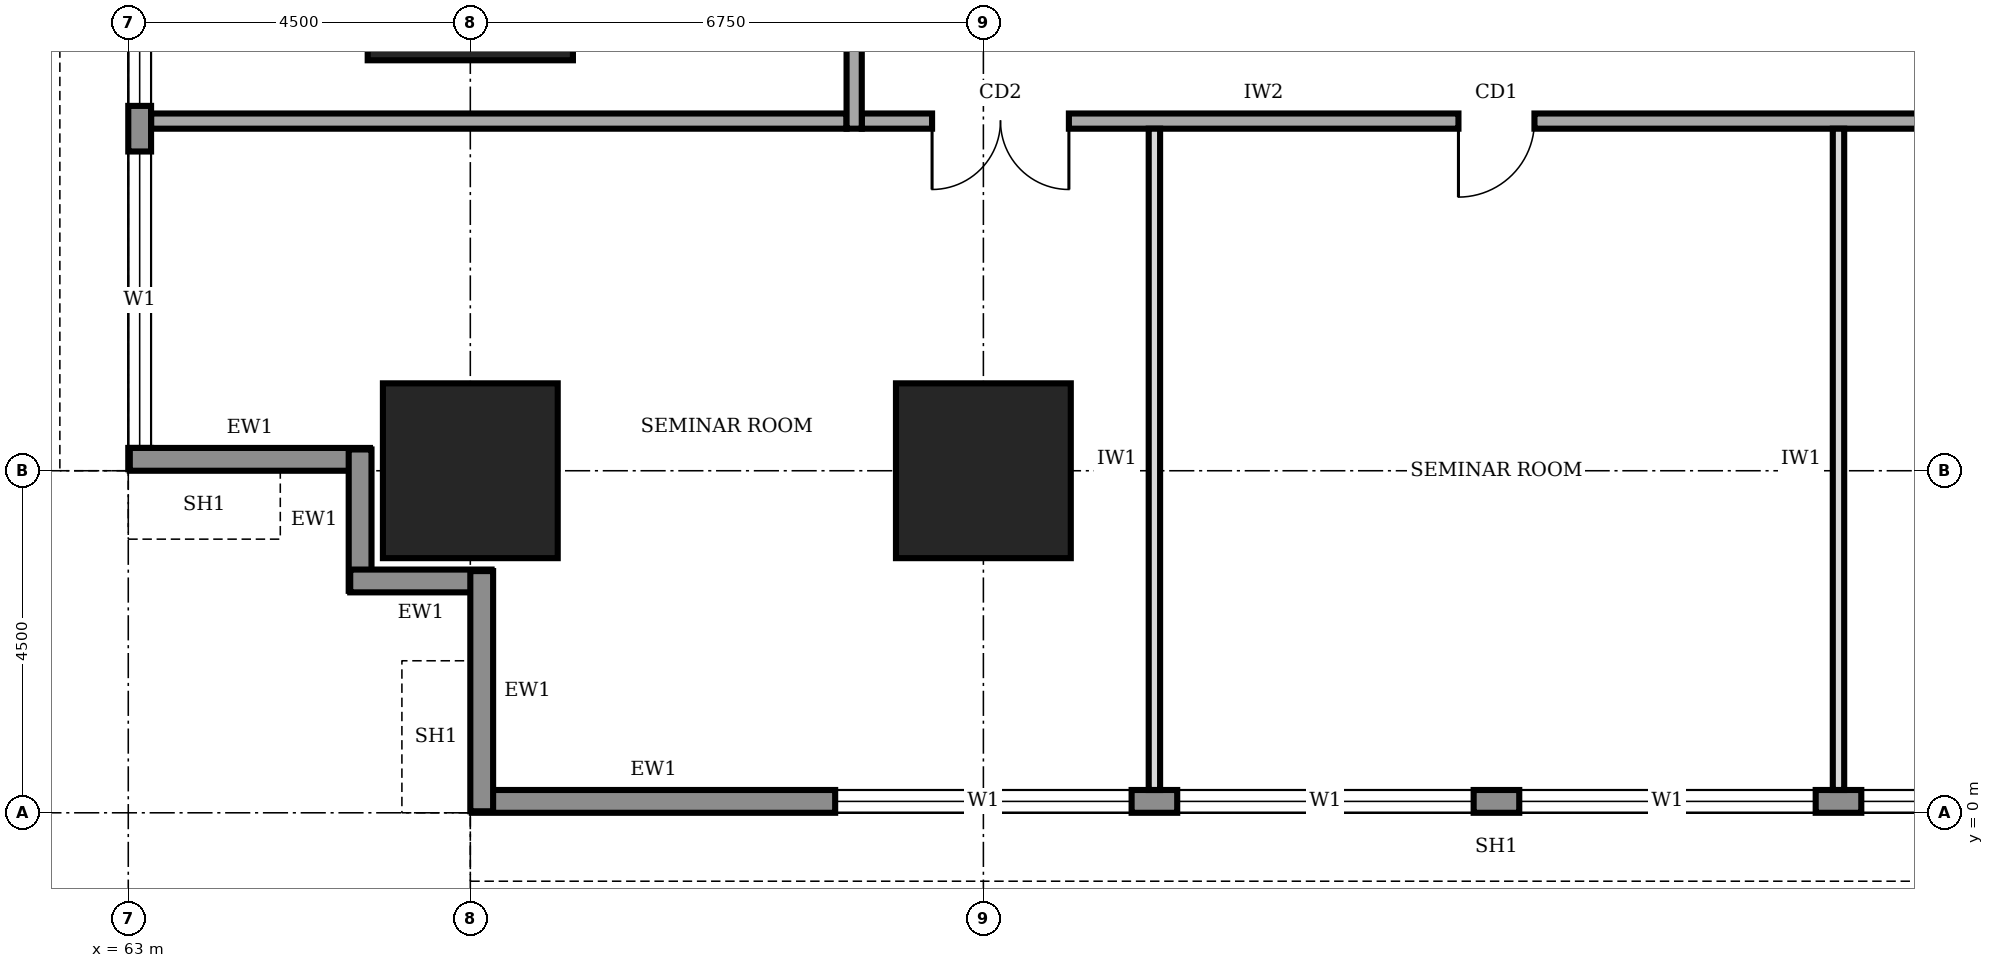
"""IFC4 building model, lengths in metres.
Left out: names, types, materials, properties, quantities, classifications, styles, units other than length and angle.
Written with IfcOpenShell. Run it as: python <this file> out.ifc"""

import sys

from ifc_helpers import new_model, si_unit, direction, frame, frame_2d, origin, origin_2d, place, context, subcontext, project, spatial, rectangle, extrude, element, fill, save


model = new_model("IFC4")
c1 = context("Model", 3, precision=1e-05, world=origin(), true_north=direction((0.0, 1.0)))
c2 = subcontext(c1, "Body", "Model", "MODEL_VIEW")
j1 = project(units=[si_unit("LENGTHUNIT", "METRE"), si_unit("PLANEANGLEUNIT", "RADIAN")], contexts=[c1])
p1 = place(None, origin())
s1 = spatial("IfcSite", under=j1, at=p1, CompositionType="ELEMENT")
p2 = place(p1, origin())
s2 = spatial("IfcBuilding", under=s1, at=p2, CompositionType="ELEMENT")
p3 = place(p2, frame((0.0, 0.0, 29.0)))
s3 = spatial("IfcBuildingStorey", under=s2, at=p3, CompositionType="ELEMENT", Elevation=29.0)
for number, where, z_axis, x_axis in (
    (1, (67.5, 4.5, 0.0), (0.0, 0.0, 1.0), (1.0, 0.0, 0.0)),
    (2, (74.25, 4.5, 0.0), (0.0, 0.0, 1.0), (1.0, 0.0, 0.0)),
):
    element("IfcColumn", number, at=place(p3, frame(where, z_axis=z_axis, x_axis=x_axis)), inside=s3, PredefinedType="COLUMN", context=c2, shape_type="SweptSolid", body=[
        extrude(rectangle(XDim=2.3, YDim=2.3, at=origin_2d()), origin(), (0.0, 0.0, 1.0), 4.0),
    ])
p4 = place(p3, frame((67.5, 11.25, 0.0), z_axis=(0.0, 0.0, 1.0), x_axis=(1.0, 0.0, 0.0)))
e3 = element("IfcColumn", 3, at=p4, inside=s3, PredefinedType="COLUMN", context=c2, shape_type="SweptSolid", body=[
    extrude(rectangle(XDim=2.7, YDim=2.7, at=origin_2d()), origin(), (0.0, 0.0, 1.0), 4.0),
])
p5 = place(p3, frame((67.52, 0.15, 0.0), z_axis=(0.0, 0.0, 1.0), x_axis=(1.0, 0.0, 0.0)))
e4 = element("IfcWall", 4, at=p5, inside=s3, PredefinedType="STANDARD", context=c2, shape_type="SweptSolid", body=[
    extrude(rectangle(XDim=26.96, YDim=0.3, at=frame_2d((13.48, 0.0))), origin(), (0.0, 0.0, 1.0), 3.75),
])
p6 = place(p5, frame((4.78, 0.0, 0.9)))
e5 = element("IfcOpeningElement", 5, at=p6, cuts=e4, PredefinedType="OPENING", context=c2, shape_type="SweptSolid", body=[
    extrude(rectangle(XDim=3.9, YDim=2.2, at=frame_2d((1.95, 1.1))), frame((0.0, 0.16, 0.0), z_axis=(0.0, -1.0, 0.0), x_axis=(1.0, 0.0, 0.0)), (0.0, 0.0, 1.0), 0.32),
])
p7 = place(p5, frame((9.28, 0.0, 0.9)))
e6 = element("IfcOpeningElement", 6, at=p7, cuts=e4, PredefinedType="OPENING", context=c2, shape_type="SweptSolid", body=[
    extrude(rectangle(XDim=3.9, YDim=2.2, at=frame_2d((1.95, 1.1))), frame((0.0, 0.16, 0.0), z_axis=(0.0, -1.0, 0.0), x_axis=(1.0, 0.0, 0.0)), (0.0, 0.0, 1.0), 0.32),
])
p8 = place(p5, frame((13.78, 0.0, 0.9)))
e7 = element("IfcOpeningElement", 7, at=p8, cuts=e4, PredefinedType="OPENING", context=c2, shape_type="SweptSolid", body=[
    extrude(rectangle(XDim=3.9, YDim=2.2, at=frame_2d((1.95, 1.1))), frame((0.0, 0.16, 0.0), z_axis=(0.0, -1.0, 0.0), x_axis=(1.0, 0.0, 0.0)), (0.0, 0.0, 1.0), 0.32),
])
p9 = place(p5, frame((18.28, 0.0, 0.9)))
e8 = element("IfcOpeningElement", 8, at=p9, cuts=e4, PredefinedType="OPENING", context=c2, shape_type="SweptSolid", body=[
    extrude(rectangle(XDim=3.9, YDim=2.2, at=frame_2d((1.95, 1.1))), frame((0.0, 0.16, 0.0), z_axis=(0.0, -1.0, 0.0), x_axis=(1.0, 0.0, 0.0)), (0.0, 0.0, 1.0), 0.32),
])
p10 = place(p5, frame((22.78, 0.0, 0.9)))
e9 = element("IfcOpeningElement", 9, at=p10, cuts=e4, PredefinedType="OPENING", context=c2, shape_type="SweptSolid", body=[
    extrude(rectangle(XDim=3.9, YDim=2.2, at=frame_2d((1.95, 1.1))), frame((0.0, 0.16, 0.0), z_axis=(0.0, -1.0, 0.0), x_axis=(1.0, 0.0, 0.0)), (0.0, 0.0, 1.0), 0.32),
])
p11 = place(p3, frame((63.15, 35.98, 0.0), z_axis=(0.0, 0.0, 1.0), x_axis=(0.0, -1.0, 0.0)))
e10 = element("IfcWall", 10, at=p11, inside=s3, PredefinedType="STANDARD", context=c2, shape_type="SweptSolid", body=[
    extrude(rectangle(XDim=31.46, YDim=0.3, at=frame_2d((15.73, 0.0))), origin(), (0.0, 0.0, 1.0), 3.75),
])
p12 = place(p11, frame((27.28, 0.0, 0.9)))
e11 = element("IfcOpeningElement", 11, at=p12, cuts=e10, PredefinedType="OPENING", context=c2, shape_type="SweptSolid", body=[
    extrude(rectangle(XDim=3.9, YDim=2.2, at=frame_2d((1.95, 1.1))), frame((0.0, 0.16, 0.0), z_axis=(0.0, -1.0, 0.0), x_axis=(1.0, 0.0, 0.0)), (0.0, 0.0, 1.0), 0.32),
])
p13 = place(p11, frame((22.78, 0.0, 0.9)))
e12 = element("IfcOpeningElement", 12, at=p13, cuts=e10, PredefinedType="OPENING", context=c2, shape_type="SweptSolid", body=[
    extrude(rectangle(XDim=3.9, YDim=2.2, at=frame_2d((1.95, 1.1))), frame((0.0, 0.16, 0.0), z_axis=(0.0, -1.0, 0.0), x_axis=(1.0, 0.0, 0.0)), (0.0, 0.0, 1.0), 0.32),
])
p14 = place(p11, frame((18.28, 0.0, 0.9)))
e13 = element("IfcOpeningElement", 13, at=p14, cuts=e10, PredefinedType="OPENING", context=c2, shape_type="SweptSolid", body=[
    extrude(rectangle(XDim=3.9, YDim=2.2, at=frame_2d((1.95, 1.1))), frame((0.0, 0.16, 0.0), z_axis=(0.0, -1.0, 0.0), x_axis=(1.0, 0.0, 0.0)), (0.0, 0.0, 1.0), 0.32),
])
p15 = place(p11, frame((13.78, 0.0, 0.9)))
e14 = element("IfcOpeningElement", 14, at=p15, cuts=e10, PredefinedType="OPENING", context=c2, shape_type="SweptSolid", body=[
    extrude(rectangle(XDim=3.9, YDim=2.2, at=frame_2d((1.95, 1.1))), frame((0.0, 0.16, 0.0), z_axis=(0.0, -1.0, 0.0), x_axis=(1.0, 0.0, 0.0)), (0.0, 0.0, 1.0), 0.32),
])
p16 = place(p11, frame((9.28, 0.0, 0.9)))
e15 = element("IfcOpeningElement", 15, at=p16, cuts=e10, PredefinedType="OPENING", context=c2, shape_type="SweptSolid", body=[
    extrude(rectangle(XDim=3.9, YDim=2.2, at=frame_2d((1.95, 1.1))), frame((0.0, 0.16, 0.0), z_axis=(0.0, -1.0, 0.0), x_axis=(1.0, 0.0, 0.0)), (0.0, 0.0, 1.0), 0.32),
])
p17 = place(p11, frame((4.78, 0.0, 0.9)))
e16 = element("IfcOpeningElement", 16, at=p17, cuts=e10, PredefinedType="OPENING", context=c2, shape_type="SweptSolid", body=[
    extrude(rectangle(XDim=3.9, YDim=2.2, at=frame_2d((1.95, 1.1))), frame((0.0, 0.16, 0.0), z_axis=(0.0, -1.0, 0.0), x_axis=(1.0, 0.0, 0.0)), (0.0, 0.0, 1.0), 0.32),
])
p18 = place(p3, frame((63.02, 4.65, 0.0), z_axis=(0.0, 0.0, 1.0), x_axis=(1.0, 0.0, 0.0)))
e17 = element("IfcWall", 17, at=p18, inside=s3, PredefinedType="STANDARD", context=c2, shape_type="SweptSolid", body=[
    extrude(rectangle(XDim=3.16, YDim=0.3, at=frame_2d((1.58, 0.0))), origin(), (0.0, 0.0, 1.0), 2.85),
])
for number, where, z_axis, x_axis in (
    (18, (66.05, 4.78, 0.0), (0.0, 0.0, 1.0), (0.0, -1.0, 0.0)),
    (19, (65.92, 3.05, 0.0), (0.0, 0.0, 1.0), (1.0, 0.0, 0.0)),
):
    element("IfcWall", number, at=place(p3, frame(where, z_axis=z_axis, x_axis=x_axis)), inside=s3, PredefinedType="STANDARD", context=c2, shape_type="SweptSolid", body=[
        extrude(rectangle(XDim=1.86, YDim=0.3, at=frame_2d((0.93, 0.0))), origin(), (0.0, 0.0, 1.0), 3.75),
    ])
p19 = place(p3, frame((67.65, 3.18, 0.0), z_axis=(0.0, 0.0, 1.0), x_axis=(0.0, -1.0, 0.0)))
e20 = element("IfcWall", 20, at=p19, inside=s3, PredefinedType="STANDARD", context=c2, shape_type="SweptSolid", body=[
    extrude(rectangle(XDim=3.16, YDim=0.3, at=frame_2d((1.58, 0.0))), origin(), (0.0, 0.0, 1.0), 2.85),
])
p20 = place(p3, frame((72.65, 9.1, 0.0), z_axis=(0.0, 0.0, 1.0), x_axis=(1.0, 0.0, 0.0)))
e21 = element("IfcWall", 21, at=p20, inside=s3, PredefinedType="SOLIDWALL", context=c2, shape_type="SweptSolid", body=[
    extrude(rectangle(XDim=16.9, YDim=0.2, at=frame_2d((8.45, 0.0))), origin(), (0.0, 0.0, 1.0), 3.75),
])
p21 = place(p20, frame((0.925, 0.0, 0.0)))
e22 = element("IfcOpeningElement", 22, at=p21, cuts=e21, PredefinedType="OPENING", context=c2, shape_type="SweptSolid", body=[
    extrude(rectangle(XDim=1.8, YDim=2.1, at=frame_2d((0.9, 1.05))), frame((0.0, 0.11, 0.0), z_axis=(0.0, -1.0, 0.0), x_axis=(1.0, 0.0, 0.0)), (0.0, 0.0, 1.0), 0.22),
])
p22 = place(p20, frame((7.85, 0.0, 0.0)))
e23 = element("IfcOpeningElement", 23, at=p22, cuts=e21, PredefinedType="OPENING", context=c2, shape_type="SweptSolid", body=[
    extrude(rectangle(XDim=1.0, YDim=2.1, at=frame_2d((0.5, 1.05))), frame((0.0, 0.11, 0.0), z_axis=(0.0, -1.0, 0.0), x_axis=(1.0, 0.0, 0.0)), (0.0, 0.0, 1.0), 0.22),
])
p23 = place(p20, frame((13.975, 0.0, 0.0)))
e24 = element("IfcOpeningElement", 24, at=p23, cuts=e21, PredefinedType="OPENING", context=c2, shape_type="SweptSolid", body=[
    extrude(rectangle(XDim=1.8, YDim=2.1, at=frame_2d((0.9, 1.05))), frame((0.0, 0.11, 0.0), z_axis=(0.0, -1.0, 0.0), x_axis=(1.0, 0.0, 0.0)), (0.0, 0.0, 1.0), 0.22),
])
p24 = place(p3, frame((72.55, 32.8, 0.0), z_axis=(0.0, 0.0, 1.0), x_axis=(0.0, -1.0, 0.0)))
e25 = element("IfcWall", 25, at=p24, inside=s3, PredefinedType="SOLIDWALL", context=c2, shape_type="SweptSolid", body=[
    extrude(rectangle(XDim=23.8, YDim=0.2, at=frame_2d((11.9, 0.0))), origin(), (0.0, 0.0, 1.0), 3.75),
])
p25 = place(p24, frame((21.05, 0.0, 0.0)))
e26 = element("IfcOpeningElement", 26, at=p25, cuts=e25, PredefinedType="OPENING", context=c2, shape_type="SweptSolid", body=[
    extrude(rectangle(XDim=1.0, YDim=2.1, at=frame_2d((0.5, 1.05))), frame((0.0, 0.11, 0.0), z_axis=(0.0, -1.0, 0.0), x_axis=(1.0, 0.0, 0.0)), (0.0, 0.0, 1.0), 0.22),
])
p26 = place(p24, frame((16.55, 0.0, 0.0)))
e27 = element("IfcOpeningElement", 27, at=p26, cuts=e25, PredefinedType="OPENING", context=c2, shape_type="SweptSolid", body=[
    extrude(rectangle(XDim=1.0, YDim=2.1, at=frame_2d((0.5, 1.05))), frame((0.0, 0.11, 0.0), z_axis=(0.0, -1.0, 0.0), x_axis=(1.0, 0.0, 0.0)), (0.0, 0.0, 1.0), 0.22),
])
p27 = place(p24, frame((12.05, 0.0, 0.0)))
e28 = element("IfcOpeningElement", 28, at=p27, cuts=e25, PredefinedType="OPENING", context=c2, shape_type="SweptSolid", body=[
    extrude(rectangle(XDim=1.0, YDim=2.1, at=frame_2d((0.5, 1.05))), frame((0.0, 0.11, 0.0), z_axis=(0.0, -1.0, 0.0), x_axis=(1.0, 0.0, 0.0)), (0.0, 0.0, 1.0), 0.22),
])
p28 = place(p24, frame((7.55, 0.0, 0.0)))
e29 = element("IfcOpeningElement", 29, at=p28, cuts=e25, PredefinedType="OPENING", context=c2, shape_type="SweptSolid", body=[
    extrude(rectangle(XDim=1.0, YDim=2.1, at=frame_2d((0.5, 1.05))), frame((0.0, 0.11, 0.0), z_axis=(0.0, -1.0, 0.0), x_axis=(1.0, 0.0, 0.0)), (0.0, 0.0, 1.0), 0.22),
])
p29 = place(p24, frame((2.3, 0.0, 0.0)))
e30 = element("IfcOpeningElement", 30, at=p29, cuts=e25, PredefinedType="OPENING", context=c2, shape_type="SweptSolid", body=[
    extrude(rectangle(XDim=1.0, YDim=2.1, at=frame_2d((0.5, 1.05))), frame((0.0, 0.11, 0.0), z_axis=(0.0, -1.0, 0.0), x_axis=(1.0, 0.0, 0.0)), (0.0, 0.0, 1.0), 0.22),
])
p30 = place(p3, frame((63.3, 9.1, 0.0), z_axis=(0.0, 0.0, 1.0), x_axis=(1.0, 0.0, 0.0)))
e31 = element("IfcWall", 31, at=p30, inside=s3, PredefinedType="SOLIDWALL", context=c2, shape_type="SweptSolid", body=[
    extrude(rectangle(XDim=9.15, YDim=0.2, at=frame_2d((4.575, 0.0))), origin(), (0.0, 0.0, 1.0), 3.75),
])
for number, where, z_axis, x_axis in (
    (32, (76.5, 0.3, 0.0), (0.0, 0.0, 1.0), (0.0, 1.0, 0.0)),
    (33, (85.5, 0.3, 0.0), (0.0, 0.0, 1.0), (0.0, 1.0, 0.0)),
):
    element("IfcWall", number, at=place(p3, frame(where, z_axis=z_axis, x_axis=x_axis)), inside=s3, PredefinedType="PARTITIONING", context=c2, shape_type="SweptSolid", body=[
        extrude(rectangle(XDim=8.7, YDim=0.15, at=frame_2d((4.35, 0.0))), origin(), (0.0, 0.0, 1.0), 3.75),
    ])
p31 = place(p6, origin())
e34 = element("IfcWindow", 34, at=p31, inside=s3, PartitioningType="SINGLE_PANEL", PredefinedType="WINDOW", context=c2, shape_type="SweptSolid", body=[
    extrude(rectangle(XDim=3.9, YDim=2.2, at=frame_2d((1.95, 1.1))), frame((0.0, 0.03, 0.0), z_axis=(0.0, -1.0, 0.0), x_axis=(1.0, 0.0, 0.0)), (0.0, 0.0, 1.0), 0.06),
])
fill(e5, e34)
p32 = place(p7, origin())
e35 = element("IfcWindow", 35, at=p32, inside=s3, PartitioningType="SINGLE_PANEL", PredefinedType="WINDOW", context=c2, shape_type="SweptSolid", body=[
    extrude(rectangle(XDim=3.9, YDim=2.2, at=frame_2d((1.95, 1.1))), frame((0.0, 0.03, 0.0), z_axis=(0.0, -1.0, 0.0), x_axis=(1.0, 0.0, 0.0)), (0.0, 0.0, 1.0), 0.06),
])
fill(e6, e35)
p33 = place(p8, origin())
e36 = element("IfcWindow", 36, at=p33, inside=s3, PartitioningType="SINGLE_PANEL", PredefinedType="WINDOW", context=c2, shape_type="SweptSolid", body=[
    extrude(rectangle(XDim=3.9, YDim=2.2, at=frame_2d((1.95, 1.1))), frame((0.0, 0.03, 0.0), z_axis=(0.0, -1.0, 0.0), x_axis=(1.0, 0.0, 0.0)), (0.0, 0.0, 1.0), 0.06),
])
fill(e7, e36)
p34 = place(p9, origin())
e37 = element("IfcWindow", 37, at=p34, inside=s3, PartitioningType="SINGLE_PANEL", PredefinedType="WINDOW", context=c2, shape_type="SweptSolid", body=[
    extrude(rectangle(XDim=3.9, YDim=2.2, at=frame_2d((1.95, 1.1))), frame((0.0, 0.03, 0.0), z_axis=(0.0, -1.0, 0.0), x_axis=(1.0, 0.0, 0.0)), (0.0, 0.0, 1.0), 0.06),
])
fill(e8, e37)
p35 = place(p12, origin())
e38 = element("IfcWindow", 38, at=p35, inside=s3, PartitioningType="SINGLE_PANEL", PredefinedType="WINDOW", context=c2, shape_type="SweptSolid", body=[
    extrude(rectangle(XDim=3.9, YDim=2.2, at=frame_2d((1.95, 1.1))), frame((0.0, 0.03, 0.0), z_axis=(0.0, -1.0, 0.0), x_axis=(1.0, 0.0, 0.0)), (0.0, 0.0, 1.0), 0.06),
])
fill(e11, e38)
p36 = place(p13, origin())
e39 = element("IfcWindow", 39, at=p36, inside=s3, PartitioningType="SINGLE_PANEL", PredefinedType="WINDOW", context=c2, shape_type="SweptSolid", body=[
    extrude(rectangle(XDim=3.9, YDim=2.2, at=frame_2d((1.95, 1.1))), frame((0.0, 0.03, 0.0), z_axis=(0.0, -1.0, 0.0), x_axis=(1.0, 0.0, 0.0)), (0.0, 0.0, 1.0), 0.06),
])
fill(e12, e39)
p37 = place(p21, frame((1.8, 0.0, 0.0), z_axis=(0.0, 0.0, 1.0), x_axis=(-1.0, 0.0, 0.0)))
e40 = element("IfcDoor", 40, at=p37, inside=s3, OperationType="DOUBLE_DOOR_SINGLE_SWING", PredefinedType="DOOR", context=c2, shape_type="SweptSolid", body=[
    extrude(rectangle(XDim=1.8, YDim=2.1, at=frame_2d((0.9, 1.05))), frame((0.0, 0.025, 0.0), z_axis=(0.0, -1.0, 0.0), x_axis=(1.0, 0.0, 0.0)), (0.0, 0.0, 1.0), 0.05),
])
fill(e22, e40)
p38 = place(p22, frame((1.0, 0.0, 0.0), z_axis=(0.0, 0.0, 1.0), x_axis=(-1.0, 0.0, 0.0)))
e41 = element("IfcDoor", 41, at=p38, inside=s3, OperationType="SINGLE_SWING_RIGHT", PredefinedType="DOOR", context=c2, shape_type="SweptSolid", body=[
    extrude(rectangle(XDim=1.0, YDim=2.1, at=frame_2d((0.5, 1.05))), frame((0.0, 0.025, 0.0), z_axis=(0.0, -1.0, 0.0), x_axis=(1.0, 0.0, 0.0)), (0.0, 0.0, 1.0), 0.05),
])
fill(e23, e41)
save(model, sys.argv[1])
